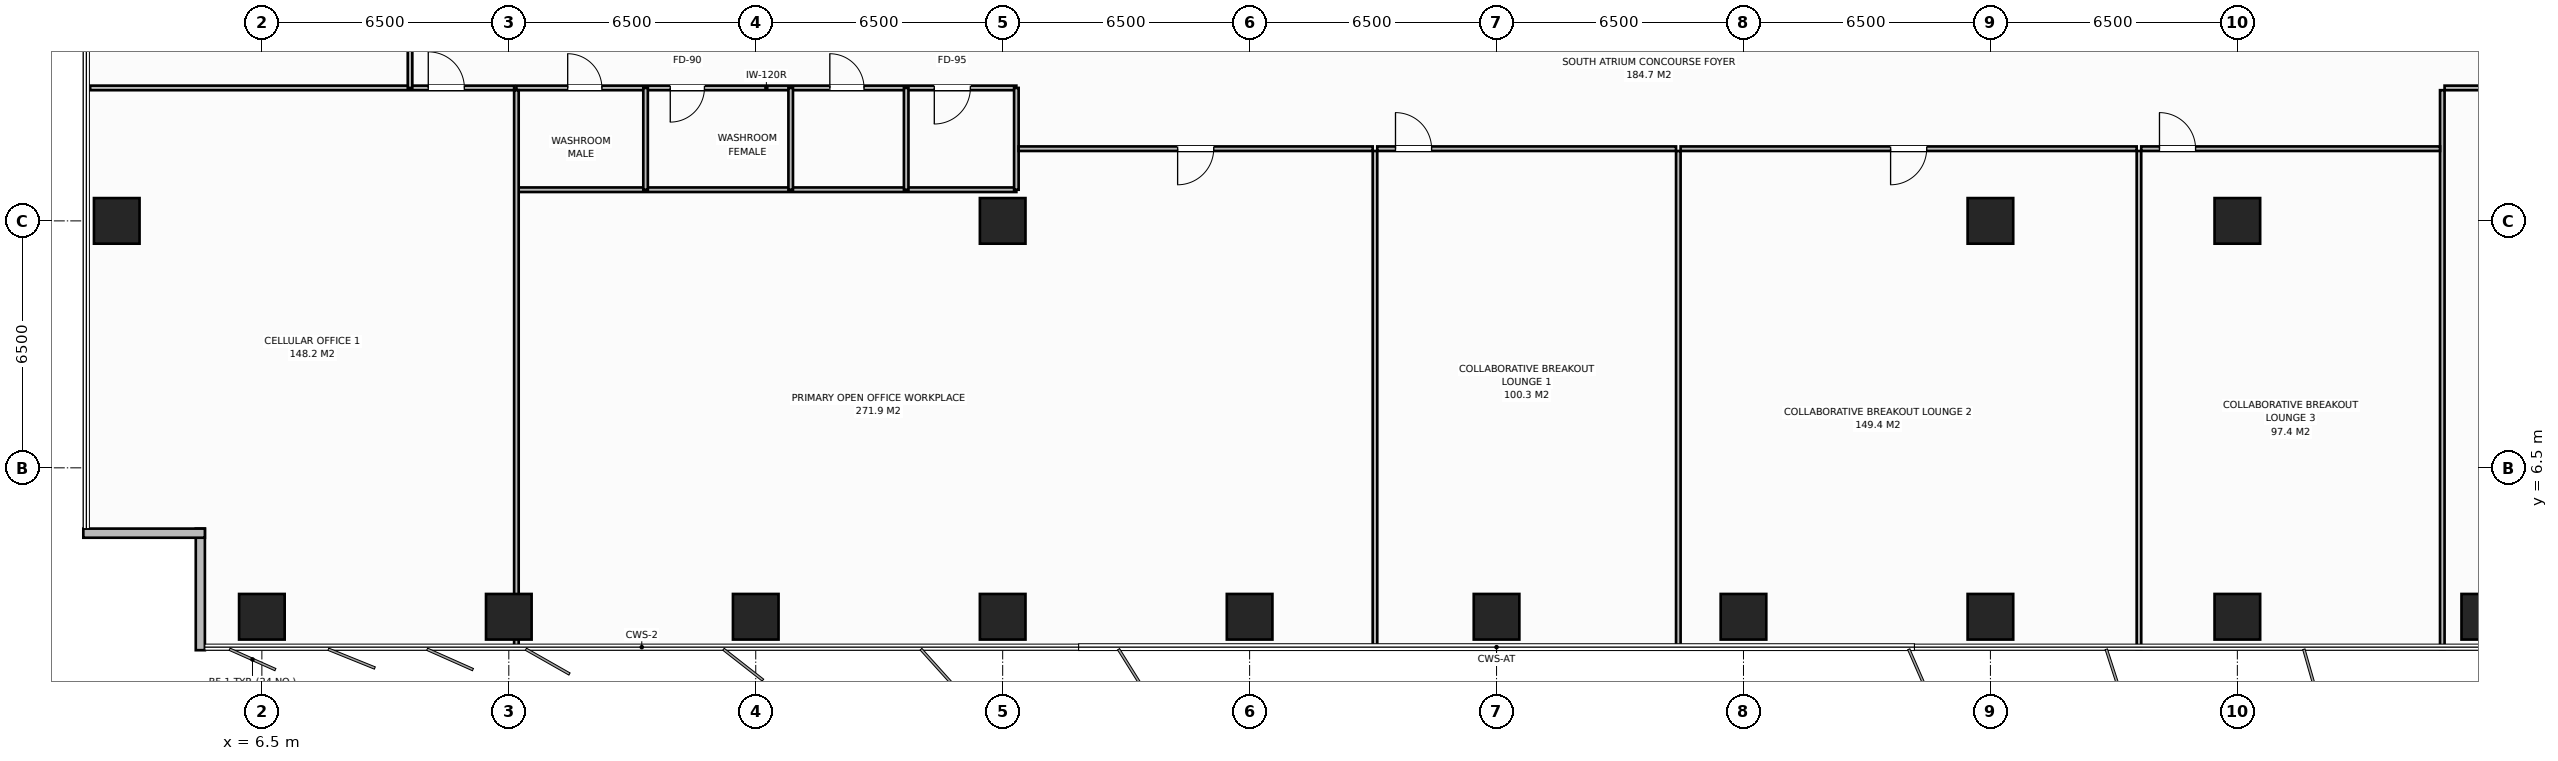
"""IFC4 building model, lengths in metres.
Left out: names, types, materials, properties, quantities, classifications, styles, units other than length and angle.
Written with IfcOpenShell. Run it as: python <this file> out.ifc"""

import sys

from ifc_helpers import new_model, si_unit, direction, frame, frame_2d, origin, origin_2d, place, context, subcontext, project, spatial, rectangle, extrude, element, fill, save


model = new_model("IFC4")
c1 = context("Model", 3, precision=1e-05, world=origin(), true_north=direction((0.0, 1.0)))
c2 = subcontext(c1, "Body", "Model", "MODEL_VIEW")
j1 = project(units=[si_unit("LENGTHUNIT", "METRE"), si_unit("PLANEANGLEUNIT", "RADIAN")], contexts=[c1])
p1 = place(None, origin())
s1 = spatial("IfcSite", under=j1, at=p1, CompositionType="ELEMENT")
p2 = place(p1, origin())
s2 = spatial("IfcBuilding", under=s1, at=p2, CompositionType="ELEMENT")
p3 = place(p2, frame((0.0, 0.0, 120.2)))
s3 = spatial("IfcBuildingStorey", under=s2, at=p3, CompositionType="ELEMENT", Elevation=120.2)
for number, where, z_axis, x_axis in (
    (1, (58.5, 13.0, 0.0), (0.0, 0.0, 1.0), (1.0, 0.0, 0.0)),
    (2, (26.0, 13.0, 0.0), (0.0, 0.0, 1.0), (1.0, 0.0, 0.0)),
    (3, (52.0, 13.0, 0.0), (0.0, 0.0, 1.0), (1.0, 0.0, 0.0)),
    (4, (6.5, 2.58, 0.0), (0.0, 0.0, 1.0), (1.0, 0.0, 0.0)),
    (5, (13.0, 2.58, 0.0), (0.0, 0.0, 1.0), (1.0, 0.0, 0.0)),
    (6, (19.5, 2.58, 0.0), (0.0, 0.0, 1.0), (1.0, 0.0, 0.0)),
    (7, (26.0, 2.58, 0.0), (0.0, 0.0, 1.0), (1.0, 0.0, 0.0)),
    (8, (32.5, 2.58, 0.0), (0.0, 0.0, 1.0), (1.0, 0.0, 0.0)),
    (9, (39.0, 2.58, 0.0), (0.0, 0.0, 1.0), (1.0, 0.0, 0.0)),
    (10, (45.5, 2.58, 0.0), (0.0, 0.0, 1.0), (1.0, 0.0, 0.0)),
    (11, (52.0, 2.58, 0.0), (0.0, 0.0, 1.0), (1.0, 0.0, 0.0)),
    (12, (58.5, 2.58, 0.0), (0.0, 0.0, 1.0), (1.0, 0.0, 0.0)),
    (13, (65.0, 2.58, 0.0), (0.0, 0.0, 1.0), (1.0, 0.0, 0.0)),
    (14, (2.68, 13.0, 0.0), (0.0, 0.0, 1.0), (1.0, 0.0, 0.0)),
):
    element("IfcColumn", number, at=place(p3, frame(where, z_axis=z_axis, x_axis=x_axis)), inside=s3, PredefinedType="COLUMN", context=c2, shape_type="SweptSolid", body=[
        extrude(rectangle(XDim=1.2, YDim=1.2, at=origin_2d()), origin(), (0.0, 0.0, 1.0), 3.8),
    ])
for number, where, z_axis, x_axis in (
    (15, (4.88, 1.7, 0.0), (0.0, 0.0, 1.0), (0.0, 1.0, 0.0)),
    (16, (5.0, 4.78, 0.0), (0.0, 0.0, 1.0), (-1.0, 0.0, 0.0)),
):
    element("IfcWall", number, at=place(p3, frame(where, z_axis=z_axis, x_axis=x_axis)), inside=s3, PredefinedType="STANDARD", context=c2, shape_type="SweptSolid", body=[
        extrude(rectangle(XDim=3.2, YDim=0.24, at=frame_2d((1.6, 0.0))), origin(), (0.0, 0.0, 1.0), 3.565),
    ])
p4 = place(p3, frame((13.2, 16.5, 0.0), z_axis=(0.0, 0.0, 1.0), x_axis=(1.0, 0.0, 0.0)))
e17 = element("IfcWall", 17, at=p4, inside=s3, PredefinedType="PARTITIONING", context=c2, shape_type="SweptSolid", body=[
    extrude(rectangle(XDim=13.16, YDim=0.12, at=frame_2d((6.58, 0.0))), origin(), (0.0, 0.0, 1.0), 3.565),
])
p5 = place(p4, frame((1.35, 0.0, 0.0)))
e18 = element("IfcOpeningElement", 18, at=p5, cuts=e17, PredefinedType="OPENING", context=c2, shape_type="SweptSolid", body=[
    extrude(rectangle(XDim=0.9, YDim=2.15, at=frame_2d((0.45, 1.075))), frame((0.0, 0.07, 0.0), z_axis=(0.0, -1.0, 0.0), x_axis=(1.0, 0.0, 0.0)), (0.0, 0.0, 1.0), 0.14),
])
p6 = place(p4, frame((4.05, 0.0, 0.0)))
e19 = element("IfcOpeningElement", 19, at=p6, cuts=e17, PredefinedType="OPENING", context=c2, shape_type="SweptSolid", body=[
    extrude(rectangle(XDim=0.9, YDim=2.15, at=frame_2d((0.45, 1.075))), frame((0.0, 0.07, 0.0), z_axis=(0.0, -1.0, 0.0), x_axis=(1.0, 0.0, 0.0)), (0.0, 0.0, 1.0), 0.14),
])
p7 = place(p4, frame((8.25, 0.0, 0.0)))
e20 = element("IfcOpeningElement", 20, at=p7, cuts=e17, PredefinedType="OPENING", context=c2, shape_type="SweptSolid", body=[
    extrude(rectangle(XDim=0.9, YDim=2.15, at=frame_2d((0.45, 1.075))), frame((0.0, 0.07, 0.0), z_axis=(0.0, -1.0, 0.0), x_axis=(1.0, 0.0, 0.0)), (0.0, 0.0, 1.0), 0.14),
])
p8 = place(p4, frame((11.0, 0.0, 0.0)))
e21 = element("IfcOpeningElement", 21, at=p8, cuts=e17, PredefinedType="OPENING", context=c2, shape_type="SweptSolid", body=[
    extrude(rectangle(XDim=0.95, YDim=2.15, at=frame_2d((0.475, 1.075))), frame((0.0, 0.07, 0.0), z_axis=(0.0, -1.0, 0.0), x_axis=(1.0, 0.0, 0.0)), (0.0, 0.0, 1.0), 0.14),
])
p9 = place(p3, frame((13.2, 13.82, 0.0), z_axis=(0.0, 0.0, 1.0), x_axis=(1.0, 0.0, 0.0)))
e22 = element("IfcWall", 22, at=p9, inside=s3, PredefinedType="PARTITIONING", context=c2, shape_type="SweptSolid", body=[
    extrude(rectangle(XDim=13.16, YDim=0.12, at=frame_2d((6.58, 0.0))), origin(), (0.0, 0.0, 1.0), 3.565),
])
for number, where, z_axis, x_axis in (
    (23, (16.6, 13.82, 0.0), (0.0, 0.0, 1.0), (0.0, 1.0, 0.0)),
    (24, (20.42, 13.82, 0.0), (0.0, 0.0, 1.0), (0.0, 1.0, 0.0)),
    (25, (23.46, 13.82, 0.0), (0.0, 0.0, 1.0), (0.0, 1.0, 0.0)),
    (26, (26.36, 13.82, 0.0), (0.0, 0.0, 1.0), (0.0, 1.0, 0.0)),
):
    element("IfcWall", number, at=place(p3, frame(where, z_axis=z_axis, x_axis=x_axis)), inside=s3, PredefinedType="PARTITIONING", context=c2, shape_type="SweptSolid", body=[
        extrude(rectangle(XDim=2.68, YDim=0.12, at=frame_2d((1.34, 0.0))), origin(), (0.0, 0.0, 1.0), 3.565),
    ])
p10 = place(p3, frame((13.2, 1.72, 0.0), z_axis=(0.0, 0.0, 1.0), x_axis=(0.0, 1.0, 0.0)))
e27 = element("IfcWall", 27, at=p10, inside=s3, PredefinedType="PARTITIONING", context=c2, shape_type="SweptSolid", body=[
    extrude(rectangle(XDim=14.72, YDim=0.12, at=frame_2d((7.36, 0.0))), origin(), (0.0, 0.0, 1.0), 2.965),
])
p11 = place(p3, frame((1.98, 16.5, 0.0), z_axis=(0.0, 0.0, 1.0), x_axis=(1.0, 0.0, 0.0)))
e28 = element("IfcWall", 28, at=p11, inside=s3, PredefinedType="PARTITIONING", context=c2, shape_type="SweptSolid", body=[
    extrude(rectangle(XDim=11.16, YDim=0.12, at=frame_2d((5.58, 0.0))), origin(), (0.0, 0.0, 1.0), 3.565),
])
p12 = place(p11, frame((8.9, 0.0, 0.0)))
e29 = element("IfcOpeningElement", 29, at=p12, cuts=e28, PredefinedType="OPENING", context=c2, shape_type="SweptSolid", body=[
    extrude(rectangle(XDim=0.95, YDim=2.15, at=frame_2d((0.475, 1.075))), frame((0.0, 0.07, 0.0), z_axis=(0.0, -1.0, 0.0), x_axis=(1.0, 0.0, 0.0)), (0.0, 0.0, 1.0), 0.14),
])
p13 = place(p3, frame((35.8, 1.72, 0.0), z_axis=(0.0, 0.0, 1.0), x_axis=(0.0, 1.0, 0.0)))
e30 = element("IfcWall", 30, at=p13, inside=s3, PredefinedType="PARTITIONING", context=c2, shape_type="SweptSolid", body=[
    extrude(rectangle(XDim=13.12, YDim=0.12, at=frame_2d((6.56, 0.0))), origin(), (0.0, 0.0, 1.0), 3.565),
])
p14 = place(p3, frame((26.42, 14.9, 0.0), z_axis=(0.0, 0.0, 1.0), x_axis=(1.0, 0.0, 0.0)))
e31 = element("IfcWall", 31, at=p14, inside=s3, PredefinedType="PARTITIONING", context=c2, shape_type="SweptSolid", body=[
    extrude(rectangle(XDim=9.32, YDim=0.12, at=frame_2d((4.66, 0.0))), origin(), (0.0, 0.0, 1.0), 3.565),
])
p15 = place(p14, frame((4.185, 0.0, 0.0)))
e32 = element("IfcOpeningElement", 32, at=p15, cuts=e31, PredefinedType="OPENING", context=c2, shape_type="SweptSolid", body=[
    extrude(rectangle(XDim=0.95, YDim=2.15, at=frame_2d((0.475, 1.075))), frame((0.0, 0.07, 0.0), z_axis=(0.0, -1.0, 0.0), x_axis=(1.0, 0.0, 0.0)), (0.0, 0.0, 1.0), 0.14),
])
p16 = place(p3, frame((43.785, 1.72, 0.0), z_axis=(0.0, 0.0, 1.0), x_axis=(0.0, 1.0, 0.0)))
e33 = element("IfcWall", 33, at=p16, inside=s3, PredefinedType="PARTITIONING", context=c2, shape_type="SweptSolid", body=[
    extrude(rectangle(XDim=13.12, YDim=0.12, at=frame_2d((6.56, 0.0))), origin(), (0.0, 0.0, 1.0), 3.565),
])
p17 = place(p3, frame((35.86, 14.9, 0.0), z_axis=(0.0, 0.0, 1.0), x_axis=(1.0, 0.0, 0.0)))
e34 = element("IfcWall", 34, at=p17, inside=s3, PredefinedType="PARTITIONING", context=c2, shape_type="SweptSolid", body=[
    extrude(rectangle(XDim=7.865, YDim=0.12, at=frame_2d((3.932, 0.0))), origin(), (0.0, 0.0, 1.0), 3.565),
])
p18 = place(p17, frame((0.48, 0.0, 0.0)))
e35 = element("IfcOpeningElement", 35, at=p18, cuts=e34, PredefinedType="OPENING", context=c2, shape_type="SweptSolid", body=[
    extrude(rectangle(XDim=0.95, YDim=2.15, at=frame_2d((0.475, 1.075))), frame((0.0, 0.07, 0.0), z_axis=(0.0, -1.0, 0.0), x_axis=(1.0, 0.0, 0.0)), (0.0, 0.0, 1.0), 0.14),
])
p19 = place(p3, frame((55.91, 1.72, 0.0), z_axis=(0.0, 0.0, 1.0), x_axis=(0.0, 1.0, 0.0)))
e36 = element("IfcWall", 36, at=p19, inside=s3, PredefinedType="PARTITIONING", context=c2, shape_type="SweptSolid", body=[
    extrude(rectangle(XDim=13.12, YDim=0.12, at=frame_2d((6.56, 0.0))), origin(), (0.0, 0.0, 1.0), 3.565),
])
p20 = place(p3, frame((43.845, 14.9, 0.0), z_axis=(0.0, 0.0, 1.0), x_axis=(1.0, 0.0, 0.0)))
e37 = element("IfcWall", 37, at=p20, inside=s3, PredefinedType="PARTITIONING", context=c2, shape_type="SweptSolid", body=[
    extrude(rectangle(XDim=12.005, YDim=0.12, at=frame_2d((6.002, 0.0))), origin(), (0.0, 0.0, 1.0), 3.565),
])
p21 = place(p20, frame((5.528, 0.0, 0.0)))
e38 = element("IfcOpeningElement", 38, at=p21, cuts=e37, PredefinedType="OPENING", context=c2, shape_type="SweptSolid", body=[
    extrude(rectangle(XDim=0.95, YDim=2.15, at=frame_2d((0.475, 1.075))), frame((0.0, 0.07, 0.0), z_axis=(0.0, -1.0, 0.0), x_axis=(1.0, 0.0, 0.0)), (0.0, 0.0, 1.0), 0.14),
])
p22 = place(p3, frame((63.895, 1.72, 0.0), z_axis=(0.0, 0.0, 1.0), x_axis=(0.0, 1.0, 0.0)))
e39 = element("IfcWall", 39, at=p22, inside=s3, PredefinedType="PARTITIONING", context=c2, shape_type="SweptSolid", body=[
    extrude(rectangle(XDim=14.72, YDim=0.12, at=frame_2d((7.36, 0.0))), origin(), (0.0, 0.0, 1.0), 3.565),
])
p23 = place(p3, frame((55.97, 14.9, 0.0), z_axis=(0.0, 0.0, 1.0), x_axis=(1.0, 0.0, 0.0)))
e40 = element("IfcWall", 40, at=p23, inside=s3, PredefinedType="PARTITIONING", context=c2, shape_type="SweptSolid", body=[
    extrude(rectangle(XDim=7.865, YDim=0.12, at=frame_2d((3.933, 0.0))), origin(), (0.0, 0.0, 1.0), 3.565),
])
p24 = place(p23, frame((0.48, 0.0, 0.0)))
e41 = element("IfcOpeningElement", 41, at=p24, cuts=e40, PredefinedType="OPENING", context=c2, shape_type="SweptSolid", body=[
    extrude(rectangle(XDim=0.95, YDim=2.15, at=frame_2d((0.475, 1.075))), frame((0.0, 0.07, 0.0), z_axis=(0.0, -1.0, 0.0), x_axis=(1.0, 0.0, 0.0)), (0.0, 0.0, 1.0), 0.14),
])
p25 = place(p3, frame((63.955, 16.5, 0.0), z_axis=(0.0, 0.0, 1.0), x_axis=(1.0, 0.0, 0.0)))
e42 = element("IfcWall", 42, at=p25, inside=s3, PredefinedType="PARTITIONING", context=c2, shape_type="SweptSolid", body=[
    extrude(rectangle(XDim=12.065, YDim=0.12, at=frame_2d((6.033, 0.0))), origin(), (0.0, 0.0, 1.0), 3.565),
])
p26 = place(p25, frame((2.215, 0.0, 0.0)))
e43 = element("IfcOpeningElement", 43, at=p26, cuts=e42, PredefinedType="OPENING", context=c2, shape_type="SweptSolid", body=[
    extrude(rectangle(XDim=0.95, YDim=2.15, at=frame_2d((0.475, 1.075))), frame((0.0, 0.07, 0.0), z_axis=(0.0, -1.0, 0.0), x_axis=(1.0, 0.0, 0.0)), (0.0, 0.0, 1.0), 0.14),
])
p27 = place(p3, frame((10.4, 16.5, 0.0), z_axis=(0.0, 0.0, 1.0), x_axis=(0.0, 1.0, 0.0)))
e44 = element("IfcWall", 44, at=p27, inside=s3, PredefinedType="PARTITIONING", context=c2, shape_type="SweptSolid", body=[
    extrude(rectangle(XDim=6.333, YDim=0.12, at=frame_2d((3.167, 0.0))), origin(), (0.0, 0.0, 1.0), 3.565),
])
p28 = place(p27, frame((3.742, 0.0, 0.0)))
e45 = element("IfcOpeningElement", 45, at=p28, cuts=e44, PredefinedType="OPENING", context=c2, shape_type="SweptSolid", body=[
    extrude(rectangle(XDim=0.95, YDim=2.15, at=frame_2d((0.475, 1.075))), frame((0.0, 0.07, 0.0), z_axis=(0.0, -1.0, 0.0), x_axis=(1.0, 0.0, 0.0)), (0.0, 0.0, 1.0), 0.14),
])
p29 = place(p5, origin())
e46 = element("IfcDoor", 46, at=p29, inside=s3, OperationType="SINGLE_SWING_LEFT", PredefinedType="DOOR", context=c2, shape_type="SweptSolid", body=[
    extrude(rectangle(XDim=0.9, YDim=2.15, at=frame_2d((0.45, 1.075))), frame((0.0, 0.025, 0.0), z_axis=(0.0, -1.0, 0.0), x_axis=(1.0, 0.0, 0.0)), (0.0, 0.0, 1.0), 0.05),
])
fill(e18, e46)
p30 = place(p6, origin())
e47 = element("IfcDoor", 47, at=p30, inside=s3, OperationType="SINGLE_SWING_RIGHT", PredefinedType="DOOR", context=c2, shape_type="SweptSolid", body=[
    extrude(rectangle(XDim=0.9, YDim=2.15, at=frame_2d((0.45, 1.075))), frame((0.0, 0.025, 0.0), z_axis=(0.0, -1.0, 0.0), x_axis=(1.0, 0.0, 0.0)), (0.0, 0.0, 1.0), 0.05),
])
fill(e19, e47)
p31 = place(p7, origin())
e48 = element("IfcDoor", 48, at=p31, inside=s3, OperationType="SINGLE_SWING_LEFT", PredefinedType="DOOR", context=c2, shape_type="SweptSolid", body=[
    extrude(rectangle(XDim=0.9, YDim=2.15, at=frame_2d((0.45, 1.075))), frame((0.0, 0.025, 0.0), z_axis=(0.0, -1.0, 0.0), x_axis=(1.0, 0.0, 0.0)), (0.0, 0.0, 1.0), 0.05),
])
fill(e20, e48)
p32 = place(p8, origin())
e49 = element("IfcDoor", 49, at=p32, inside=s3, OperationType="SINGLE_SWING_RIGHT", PredefinedType="DOOR", context=c2, shape_type="SweptSolid", body=[
    extrude(rectangle(XDim=0.95, YDim=2.15, at=frame_2d((0.475, 1.075))), frame((0.0, 0.025, 0.0), z_axis=(0.0, -1.0, 0.0), x_axis=(1.0, 0.0, 0.0)), (0.0, 0.0, 1.0), 0.05),
])
fill(e21, e49)
p33 = place(p12, origin())
e50 = element("IfcDoor", 50, at=p33, inside=s3, OperationType="SINGLE_SWING_LEFT", PredefinedType="DOOR", context=c2, shape_type="SweptSolid", body=[
    extrude(rectangle(XDim=0.95, YDim=2.15, at=frame_2d((0.475, 1.075))), frame((0.0, 0.025, 0.0), z_axis=(0.0, -1.0, 0.0), x_axis=(1.0, 0.0, 0.0)), (0.0, 0.0, 1.0), 0.05),
])
fill(e29, e50)
p34 = place(p15, origin())
e51 = element("IfcDoor", 51, at=p34, inside=s3, OperationType="SINGLE_SWING_RIGHT", PredefinedType="DOOR", context=c2, shape_type="SweptSolid", body=[
    extrude(rectangle(XDim=0.95, YDim=2.15, at=frame_2d((0.475, 1.075))), frame((0.0, 0.025, 0.0), z_axis=(0.0, -1.0, 0.0), x_axis=(1.0, 0.0, 0.0)), (0.0, 0.0, 1.0), 0.05),
])
fill(e32, e51)
p35 = place(p18, origin())
e52 = element("IfcDoor", 52, at=p35, inside=s3, OperationType="SINGLE_SWING_LEFT", PredefinedType="DOOR", context=c2, shape_type="SweptSolid", body=[
    extrude(rectangle(XDim=0.95, YDim=2.15, at=frame_2d((0.475, 1.075))), frame((0.0, 0.025, 0.0), z_axis=(0.0, -1.0, 0.0), x_axis=(1.0, 0.0, 0.0)), (0.0, 0.0, 1.0), 0.05),
])
fill(e35, e52)
p36 = place(p21, origin())
e53 = element("IfcDoor", 53, at=p36, inside=s3, OperationType="SINGLE_SWING_RIGHT", PredefinedType="DOOR", context=c2, shape_type="SweptSolid", body=[
    extrude(rectangle(XDim=0.95, YDim=2.15, at=frame_2d((0.475, 1.075))), frame((0.0, 0.025, 0.0), z_axis=(0.0, -1.0, 0.0), x_axis=(1.0, 0.0, 0.0)), (0.0, 0.0, 1.0), 0.05),
])
fill(e38, e53)
p37 = place(p24, origin())
e54 = element("IfcDoor", 54, at=p37, inside=s3, OperationType="SINGLE_SWING_LEFT", PredefinedType="DOOR", context=c2, shape_type="SweptSolid", body=[
    extrude(rectangle(XDim=0.95, YDim=2.15, at=frame_2d((0.475, 1.075))), frame((0.0, 0.025, 0.0), z_axis=(0.0, -1.0, 0.0), x_axis=(1.0, 0.0, 0.0)), (0.0, 0.0, 1.0), 0.05),
])
fill(e41, e54)
save(model, sys.argv[1])
